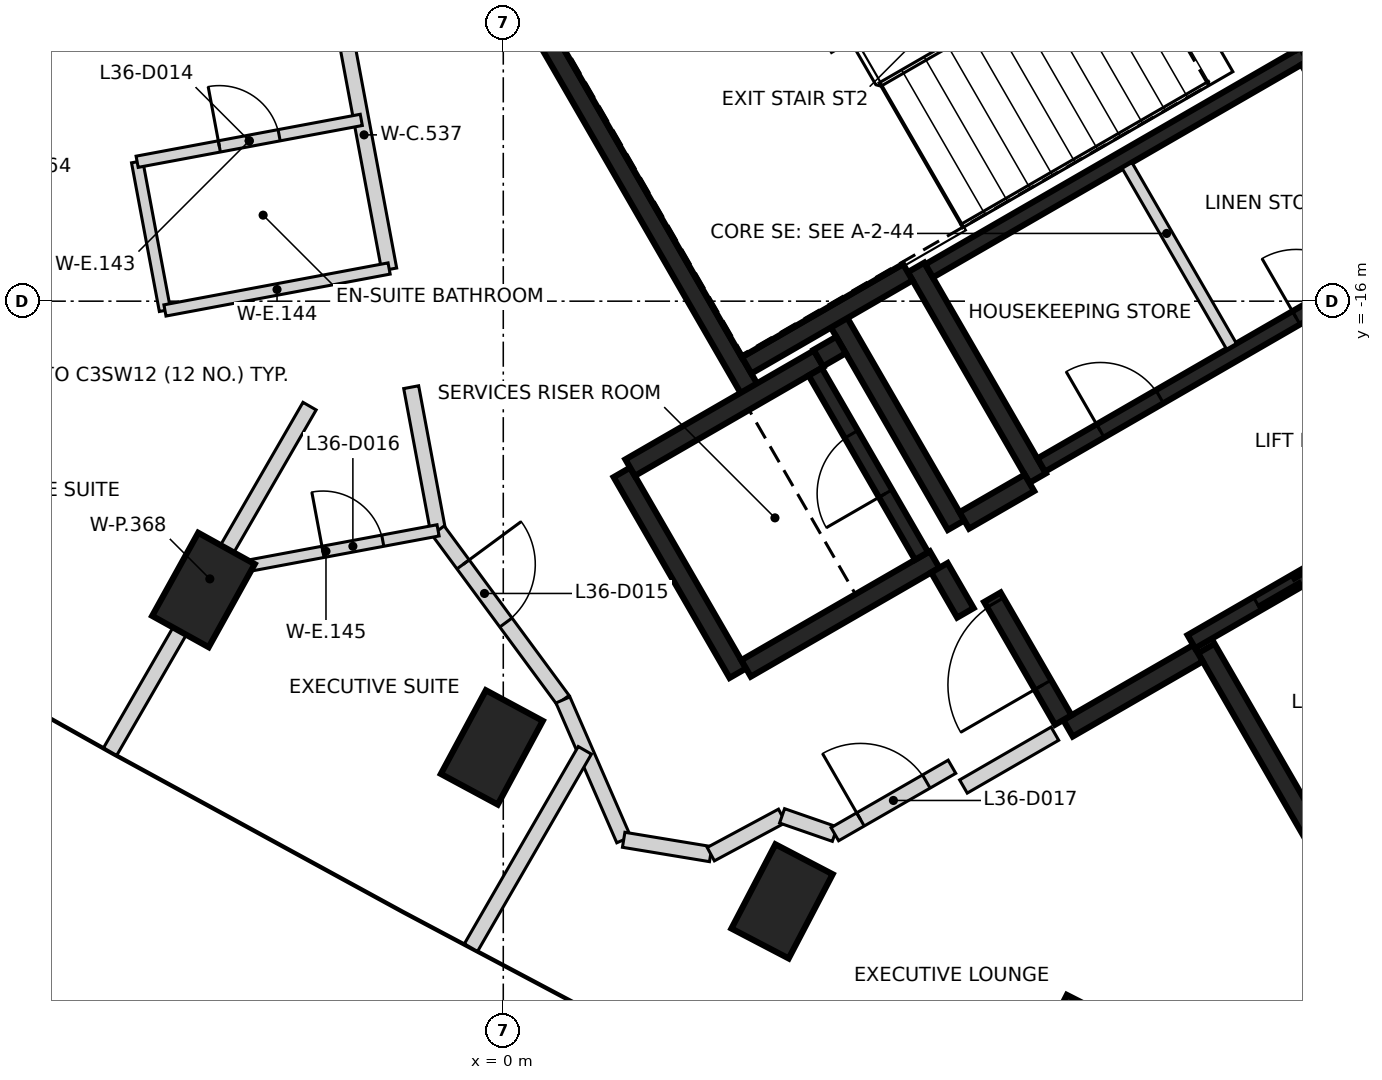
"""IFC4 building model, lengths in metres.
Left out: names, types, materials, properties, quantities, classifications, styles, units other than length and angle.
Written with IfcOpenShell. Run it as: python <this file> out.ifc"""

import sys

from ifc_helpers import new_model, si_unit, direction, frame, frame_2d, origin, origin_2d, place, context, subcontext, project, spatial, rectangle, extrude, element, fill, save


model = new_model("IFC4")
c1 = context("Model", 3, precision=1e-05, world=origin(), true_north=direction((0.0, 1.0)))
c2 = subcontext(c1, "Body", "Model", "MODEL_VIEW")
j1 = project(units=[si_unit("LENGTHUNIT", "METRE"), si_unit("PLANEANGLEUNIT", "RADIAN")], contexts=[c1])
p1 = place(None, origin())
s1 = spatial("IfcSite", under=j1, at=p1, CompositionType="ELEMENT")
p2 = place(p1, origin())
s2 = spatial("IfcBuilding", under=s1, at=p2, CompositionType="ELEMENT")
p3 = place(p2, frame((0.0, 0.0, 146.8)))
s3 = spatial("IfcBuildingStorey", under=s2, at=p3, CompositionType="ELEMENT", Elevation=146.8)
for number, where, z_axis, x_axis in (
    (1, (-3.945, -19.8, -0.4), (0.0, 0.0, 1.0), (0.485, 0.875, 0.0)),
    (2, (-0.151, -21.871, -0.4), (0.0, 0.0, 1.0), (0.474, 0.881, 0.0)),
    (3, (3.667, -23.896, -0.4), (0.0, 0.0, 1.0), (0.463, 0.886, 0.0)),
    (4, (7.51, -25.876, -0.4), (0.0, 0.0, 1.0), (0.453, 0.892, 0.0)),
):
    element("IfcColumn", number, at=place(p3, frame(where, z_axis=z_axis, x_axis=x_axis)), inside=s3, PredefinedType="COLUMN", context=c2, shape_type="SweptSolid", body=[
        extrude(rectangle(XDim=1.25, YDim=0.85, at=origin_2d()), origin(), (0.0, 0.0, 1.0), 3.6),
    ])
p4 = place(p3, frame((3.235, -17.153, 0.0), z_axis=(0.0, 0.0, 1.0), x_axis=(-0.500008851346, 0.866020293397, 0.0)))
e5 = element("IfcWall", 5, at=p4, inside=s3, PredefinedType="SHEAR", context=c2, shape_type="SweptSolid", body=[
    extrude(rectangle(XDim=5.51, YDim=0.25, at=frame_2d((2.755, 0.0))), origin(), (0.0, 0.0, 1.0), 3.2),
])
p5 = place(p3, frame((7.031, -18.327, 0.0), z_axis=(0.0, 0.0, 1.0), x_axis=(-0.499971222258, 0.866042017984, 0.0)))
e6 = element("IfcWall", 6, at=p5, inside=s3, PredefinedType="SHEAR", context=c2, shape_type="SweptSolid", body=[
    extrude(rectangle(XDim=3.2, YDim=0.25, at=frame_2d((1.6, 0.0))), origin(), (0.0, 0.0, 1.0), 3.2),
])
p6 = place(p3, frame((10.736, -23.145, 0.0), z_axis=(0.0, 0.0, 1.0), x_axis=(-0.500023226632, 0.866011993467, 0.0)))
e7 = element("IfcWall", 7, at=p6, inside=s3, PredefinedType="SHEAR", context=c2, shape_type="SweptSolid", body=[
    extrude(rectangle(XDim=2.974, YDim=0.25, at=frame_2d((1.487, 0.0))), origin(), (0.0, 0.0, 1.0), 3.2),
])
p7 = place(p3, frame((3.085, -20.894, 0.0), z_axis=(0.0, 0.0, 1.0), x_axis=(-0.499978833458, 0.866037623948, 0.0)))
e8 = element("IfcWall", 8, at=p7, inside=s3, PredefinedType="SHEAR", context=c2, shape_type="SweptSolid", body=[
    extrude(rectangle(XDim=3.05, YDim=0.25, at=frame_2d((1.525, 0.0))), origin(), (0.0, 0.0, 1.0), 3.2),
])
p8 = place(p3, frame((1.669, -18.19, 0.0), z_axis=(0.0, 0.0, 1.0), x_axis=(0.866042235819, 0.499970844928, 0.0)))
e9 = element("IfcWall", 9, at=p8, inside=s3, PredefinedType="SHEAR", context=c2, shape_type="SweptSolid", body=[
    extrude(rectangle(XDim=2.865, YDim=0.25, at=frame_2d((1.432, 0.0))), origin(), (0.0, 0.0, 1.0), 3.2),
])
p9 = place(p3, frame((5.675, -19.399, 0.0), z_axis=(0.0, 0.0, 1.0), x_axis=(-0.866026637627, -0.499997862916, 0.0)))
e10 = element("IfcWall", 10, at=p9, inside=s3, PredefinedType="SHEAR", context=c2, shape_type="SweptSolid", body=[
    extrude(rectangle(XDim=2.865, YDim=0.25, at=frame_2d((1.432, 0.0))), origin(), (0.0, 0.0, 1.0), 3.2),
])
p10 = place(p3, frame((4.414, -16.276, 0.0), z_axis=(0.0, 0.0, 1.0), x_axis=(0.500003324108, -0.866023484601, 0.0)))
e11 = element("IfcWall", 11, at=p10, inside=s3, PredefinedType="SHEAR", context=c2, shape_type="SweptSolid", body=[
    extrude(rectangle(XDim=3.085, YDim=0.25, at=frame_2d((1.542, 0.0))), origin(), (0.0, 0.0, 1.0), 3.2),
])
p11 = place(p3, frame((5.322, -15.619, 0.0), z_axis=(0.0, 0.0, 1.0), x_axis=(-0.866026229868, -0.499998569178, 0.0)))
e12 = element("IfcWall", 12, at=p11, inside=s3, PredefinedType="SHEAR", context=c2, shape_type="SweptSolid", body=[
    extrude(rectangle(XDim=2.449, YDim=0.25, at=frame_2d((1.225, 0.0))), origin(), (0.0, 0.0, 1.0), 3.2),
])
p12 = place(p3, frame((9.14, -20.631, 0.0), z_axis=(0.0, 0.0, 1.0), x_axis=(-0.866043531843, -0.499968599967, 0.0)))
e13 = element("IfcWall", 13, at=p12, inside=s3, PredefinedType="SHEAR", context=c2, shape_type="SweptSolid", body=[
    extrude(rectangle(XDim=1.975, YDim=0.25, at=frame_2d((0.987, 0.0))), origin(), (0.0, 0.0, 1.0), 3.2),
])
p13 = place(p3, frame((7.367, -21.51, 0.0), z_axis=(0.0, 0.0, 1.0), x_axis=(-0.499983108224, 0.866035156036, 0.0)))
e14 = element("IfcWall", 14, at=p13, inside=s3, PredefinedType="SHEAR", context=c2, shape_type="SweptSolid", body=[
    extrude(rectangle(XDim=1.865, YDim=0.25, at=frame_2d((0.932, 0.0))), origin(), (0.0, 0.0, 1.0), 3.2),
])
p14 = place(p13, frame((0.535, 0.0, 0.0)))
e15 = element("IfcOpeningElement", 15, at=p14, cuts=e14, PredefinedType="OPENING", context=c2, shape_type="SweptSolid", body=[
    extrude(rectangle(XDim=1.25, YDim=2.1, at=frame_2d((0.625, 1.05))), frame((0.0, 0.135, 0.0), z_axis=(0.0, -1.0, 0.0), x_axis=(1.0, 0.0, 0.0)), (0.0, 0.0, 1.0), 0.27),
])
p15 = place(p3, frame((6.065, -18.885, 0.0), z_axis=(0.0, 0.0, 1.0), x_axis=(0.866017078145, 0.500014420154, 0.0)))
e16 = element("IfcWall", 16, at=p15, inside=s3, PredefinedType="SHEAR", context=c2, shape_type="SweptSolid", body=[
    extrude(rectangle(XDim=0.989, YDim=0.25, at=frame_2d((0.495, 0.0))), origin(), (0.0, 0.0, 1.0), 3.2),
])
p16 = place(p3, frame((6.08, -20.1, 0.0), z_axis=(0.0, 0.0, 1.0), x_axis=(-0.500051773299, 0.865995510393, 0.0)))
e17 = element("IfcWall", 17, at=p16, inside=s3, PredefinedType="SHEAR", context=c2, shape_type="SweptSolid", body=[
    extrude(rectangle(XDim=0.685, YDim=0.25, at=frame_2d((0.342, 0.0))), origin(), (0.0, 0.0, 1.0), 3.2),
])
p17 = place(p3, frame((4.145, -16.749, 0.0), z_axis=(0.0, 0.0, 1.0), x_axis=(0.866185586049, 0.49972245349, 0.0)))
e18 = element("IfcWall", 18, at=p17, inside=s3, PredefinedType="SHEAR", context=c2, shape_type="SweptSolid", body=[
    extrude(rectangle(XDim=0.344, YDim=0.25, at=frame_2d((0.172, 0.0))), origin(), (0.0, 0.0, 1.0), 3.2),
])
p18 = place(p3, frame((9.052, -20.48, 0.0), z_axis=(0.0, 0.0, 1.0), x_axis=(0.866030299012, 0.499991521122, 0.0)))
e19 = element("IfcWall", 19, at=p18, inside=s3, PredefinedType="SHEAR", context=c2, shape_type="SweptSolid", body=[
    extrude(rectangle(XDim=6.1, YDim=0.2, at=frame_2d((3.05, 0.0))), origin(), (0.0, 0.0, 1.0), 3.2),
])
p19 = place(p18, frame((1.0, 0.0, 0.0)))
e20 = element("IfcOpeningElement", 20, at=p19, cuts=e19, PredefinedType="OPENING", context=c2, shape_type="SweptSolid", body=[
    extrude(rectangle(XDim=1.2, YDim=2.1, at=frame_2d((0.6, 1.05))), frame((0.0, 0.11, 0.0), z_axis=(0.0, -1.0, 0.0), x_axis=(1.0, 0.0, 0.0)), (0.0, 0.0, 1.0), 0.22),
])
p20 = place(p18, frame((4.05, 0.0, 0.0)))
e21 = element("IfcOpeningElement", 21, at=p20, cuts=e19, PredefinedType="OPENING", context=c2, shape_type="SweptSolid", body=[
    extrude(rectangle(XDim=1.2, YDim=2.1, at=frame_2d((0.6, 1.05))), frame((0.0, 0.11, 0.0), z_axis=(0.0, -1.0, 0.0), x_axis=(1.0, 0.0, 0.0)), (0.0, 0.0, 1.0), 0.22),
])
p21 = place(p3, frame((10.538, -12.752, 0.0), z_axis=(0.0, 0.0, 1.0), x_axis=(-0.866038630372, -0.499977090179, 0.0)))
e22 = element("IfcWall", 22, at=p21, inside=s3, PredefinedType="SHEAR", context=c2, shape_type="SweptSolid", body=[
    extrude(rectangle(XDim=5.699, YDim=0.2, at=frame_2d((2.85, 0.0))), origin(), (0.0, 0.0, 1.0), 3.2),
])
p22 = place(p3, frame((7.077, -18.156, 0.0), z_axis=(0.0, 0.0, 1.0), x_axis=(0.866038630372, 0.499977090179, 0.0)))
e23 = element("IfcWall", 23, at=p22, inside=s3, PredefinedType="SHEAR", context=c2, shape_type="SweptSolid", body=[
    extrude(rectangle(XDim=5.699, YDim=0.2, at=frame_2d((2.85, 0.0))), origin(), (0.0, 0.0, 1.0), 3.2),
])
p23 = place(p22, frame((0.899, 0.0, 0.0)))
e24 = element("IfcOpeningElement", 24, at=p23, cuts=e23, PredefinedType="OPENING", context=c2, shape_type="SweptSolid", body=[
    extrude(rectangle(XDim=0.9, YDim=2.1, at=frame_2d((0.45, 1.05))), frame((0.0, 0.11, 0.0), z_axis=(0.0, -1.0, 0.0), x_axis=(1.0, 0.0, 0.0)), (0.0, 0.0, 1.0), 0.22),
])
p24 = place(p22, frame((3.874, 0.0, 0.0)))
e25 = element("IfcOpeningElement", 25, at=p24, cuts=e23, PredefinedType="OPENING", context=c2, shape_type="SweptSolid", body=[
    extrude(rectangle(XDim=0.9, YDim=2.1, at=frame_2d((0.45, 1.05))), frame((0.0, 0.11, 0.0), z_axis=(0.0, -1.0, 0.0), x_axis=(1.0, 0.0, 0.0)), (0.0, 0.0, 1.0), 0.22),
])
p25 = place(p3, frame((5.503, -19.352, 0.0), z_axis=(0.0, 0.0, 1.0), x_axis=(-0.499986818241, 0.866033014143, 0.0)))
e26 = element("IfcWall", 26, at=p25, inside=s3, PredefinedType="SHEAR", context=c2, shape_type="SweptSolid", body=[
    extrude(rectangle(XDim=2.798, YDim=0.2, at=frame_2d((1.399, 0.0))), origin(), (0.0, 0.0, 1.0), 3.2),
])
p26 = place(p25, frame((0.949, 0.0, 0.0)))
e27 = element("IfcOpeningElement", 27, at=p26, cuts=e26, PredefinedType="OPENING", context=c2, shape_type="SweptSolid", body=[
    extrude(rectangle(XDim=0.9, YDim=2.1, at=frame_2d((0.45, 1.05))), frame((0.0, 0.11, 0.0), z_axis=(0.0, -1.0, 0.0), x_axis=(1.0, 0.0, 0.0)), (0.0, 0.0, 1.0), 0.22),
])
p27 = place(p3, frame((11.963, -15.22, 0.0), z_axis=(0.0, 0.0, 1.0), x_axis=(-0.500034990121, 0.866005201286, 0.0)))
e28 = element("IfcWall", 28, at=p27, inside=s3, PredefinedType="SHEAR", context=c2, shape_type="SweptSolid", body=[
    extrude(rectangle(XDim=2.75, YDim=0.2, at=frame_2d((1.375, 0.0))), origin(), (0.0, 0.0, 1.0), 3.2),
])
p28 = place(p3, frame((8.207, -14.214, 0.0), z_axis=(0.0, 0.0, 1.0), x_axis=(0.50002746344, -0.86600954718, 0.0)))
e29 = element("IfcWall", 29, at=p28, inside=s3, PredefinedType="PARTITIONING", context=c2, shape_type="SweptSolid", body=[
    extrude(rectangle(XDim=2.748, YDim=0.15, at=frame_2d((1.374, 0.0))), origin(), (0.0, 0.0, 1.0), 3.2),
])
p29 = place(p3, frame((-2.162, -12.042, 0.0), z_axis=(0.0, 0.0, 1.0), x_axis=(0.183572226488, -0.983006224631, 0.0)))
e30 = element("IfcWall", 30, at=p29, inside=s3, PredefinedType="PARTITIONING", context=c2, shape_type="SweptSolid", body=[
    extrude(rectangle(XDim=3.602, YDim=0.2, at=frame_2d((1.801, 0.0))), origin(), (0.0, 0.0, 1.0), 3.2),
])
p30 = place(p3, frame((-1.212, -17.131, 0.0), z_axis=(0.0, 0.0, 1.0), x_axis=(0.183680924698, -0.982985919483, 0.0)))
e31 = element("IfcWall", 31, at=p30, inside=s3, PredefinedType="PARTITIONING", context=c2, shape_type="SweptSolid", body=[
    extrude(rectangle(XDim=1.917, YDim=0.2, at=frame_2d((0.958, 0.0))), origin(), (0.0, 0.0, 1.0), 3.2),
])
p31 = place(p3, frame((-0.858, -19.016, 0.0), z_axis=(0.0, 0.0, 1.0), x_axis=(0.593123867414, -0.805111220829, 0.0)))
e32 = element("IfcWall", 32, at=p31, inside=s3, PredefinedType="PARTITIONING", context=c2, shape_type="SweptSolid", body=[
    extrude(rectangle(XDim=2.77, YDim=0.2, at=frame_2d((1.385, 0.0))), origin(), (0.0, 0.0, 1.0), 3.2),
])
p32 = place(p31, frame((0.555, 0.0, 0.0)))
e33 = element("IfcOpeningElement", 33, at=p32, cuts=e32, PredefinedType="OPENING", context=c2, shape_type="SweptSolid", body=[
    extrude(rectangle(XDim=0.95, YDim=2.1, at=frame_2d((0.475, 1.05))), frame((0.0, 0.11, 0.0), z_axis=(0.0, -1.0, 0.0), x_axis=(1.0, 0.0, 0.0)), (0.0, 0.0, 1.0), 0.22),
])
p33 = place(p3, frame((0.785, -21.246, 0.0), z_axis=(0.0, 0.0, 1.0), x_axis=(0.398864077761, -0.917010058545, 0.0)))
e34 = element("IfcWall", 34, at=p33, inside=s3, PredefinedType="PARTITIONING", context=c2, shape_type="SweptSolid", body=[
    extrude(rectangle(XDim=2.006, YDim=0.2, at=frame_2d((1.003, 0.0))), origin(), (0.0, 0.0, 1.0), 2.3),
])
p34 = place(p3, frame((1.584, -23.086, 0.0), z_axis=(0.0, 0.0, 1.0), x_axis=(0.986654221629, -0.162829502674, 0.0)))
e35 = element("IfcWall", 35, at=p34, inside=s3, PredefinedType="PARTITIONING", context=c2, shape_type="SweptSolid", body=[
    extrude(rectangle(XDim=1.16, YDim=0.2, at=frame_2d((0.58, 0.0))), origin(), (0.0, 0.0, 1.0), 2.3),
])
p35 = place(p3, frame((2.73, -23.275, 0.0), z_axis=(0.0, 0.0, 1.0), x_axis=(0.880927165636, 0.473251866182, 0.0)))
e36 = element("IfcWall", 36, at=p35, inside=s3, PredefinedType="PARTITIONING", context=c2, shape_type="SweptSolid", body=[
    extrude(rectangle(XDim=1.065, YDim=0.2, at=frame_2d((0.532, 0.0))), origin(), (0.0, 0.0, 1.0), 3.2),
])
p36 = place(p3, frame((3.668, -22.771, 0.0), z_axis=(0.0, 0.0, 1.0), x_axis=(0.944689393684, -0.327966384652, 0.0)))
e37 = element("IfcWall", 37, at=p36, inside=s3, PredefinedType="PARTITIONING", context=c2, shape_type="SweptSolid", body=[
    extrude(rectangle(XDim=0.735, YDim=0.2, at=frame_2d((0.367, 0.0))), origin(), (0.0, 0.0, 1.0), 3.2),
])
p37 = place(p3, frame((4.362, -23.012, 0.0), z_axis=(0.0, 0.0, 1.0), x_axis=(0.866692617793, 0.49884256661, 0.0)))
e38 = element("IfcWall", 38, at=p37, inside=s3, PredefinedType="PARTITIONING", context=c2, shape_type="SweptSolid", body=[
    extrude(rectangle(XDim=1.778, YDim=0.2, at=frame_2d((0.889, 0.0))), origin(), (0.0, 0.0, 1.0), 3.2),
])
p38 = place(p37, frame((0.389, 0.0, 0.0)))
e39 = element("IfcOpeningElement", 39, at=p38, cuts=e38, PredefinedType="OPENING", context=c2, shape_type="SweptSolid", body=[
    extrude(rectangle(XDim=1.0, YDim=2.1, at=frame_2d((0.5, 1.05))), frame((0.0, 0.11, 0.0), z_axis=(0.0, -1.0, 0.0), x_axis=(1.0, 0.0, 0.0)), (0.0, 0.0, 1.0), 0.22),
])
p39 = place(p3, frame((6.054, -22.385, 0.0), z_axis=(0.0, 0.0, 1.0), x_axis=(0.86593101922, 0.500163443238, 0.0)))
e40 = element("IfcWall", 40, at=p39, inside=s3, PredefinedType="PARTITIONING", context=c2, shape_type="SweptSolid", body=[
    extrude(rectangle(XDim=1.39, YDim=0.2, at=frame_2d((0.695, 0.0))), origin(), (0.0, 0.0, 1.0), 3.2),
])
p40 = place(p3, frame((-9.882, -19.267, 0.0), z_axis=(0.0, 0.0, 1.0), x_axis=(0.499993811829, 0.866028976497, 0.0)))
e41 = element("IfcWall", 41, at=p40, inside=s3, PredefinedType="PARTITIONING", context=c2, shape_type="SweptSolid", body=[
    extrude(rectangle(XDim=12.227, YDim=0.2, at=frame_2d((6.114, 0.0))), origin(), (0.0, 0.0, 1.0), 2.3),
])
p41 = place(p3, frame((-5.173, -21.926, 0.0), z_axis=(0.0, 0.0, 1.0), x_axis=(0.499941227542, 0.86605933342, 0.0)))
e42 = element("IfcWall", 42, at=p41, inside=s3, PredefinedType="PARTITIONING", context=c2, shape_type="SweptSolid", body=[
    extrude(rectangle(XDim=5.249, YDim=0.2, at=frame_2d((2.625, 0.0))), origin(), (0.0, 0.0, 1.0), 3.2),
])
p42 = place(p3, frame((-0.425, -24.505, 0.0), z_axis=(0.0, 0.0, 1.0), x_axis=(0.499915194772, 0.86607436057, 0.0)))
e43 = element("IfcWall", 43, at=p42, inside=s3, PredefinedType="PARTITIONING", context=c2, shape_type="SweptSolid", body=[
    extrude(rectangle(XDim=2.997, YDim=0.2, at=frame_2d((1.499, 0.0))), origin(), (0.0, 0.0, 1.0), 2.3),
])
p43 = place(p3, frame((-4.817, -14.166, 0.0), z_axis=(0.0, 0.0, 1.0), x_axis=(0.183903339385, -0.982944332993, 0.0)))
e44 = element("IfcWall", 44, at=p43, inside=s3, PredefinedType="PARTITIONING", context=c2, shape_type="SweptSolid", body=[
    extrude(rectangle(XDim=1.99, YDim=0.15, at=frame_2d((0.995, 0.0))), origin(), (0.0, 0.0, 1.0), 3.2),
])
p44 = place(p3, frame((-4.817, -14.166, 0.0), z_axis=(0.0, 0.0, 1.0), x_axis=(0.982987155193, 0.183674311555, 0.0)))
e45 = element("IfcWall", 45, at=p44, inside=s3, PredefinedType="PARTITIONING", context=c2, shape_type="SweptSolid", body=[
    extrude(rectangle(XDim=3.0, YDim=0.15, at=frame_2d((1.5, 0.0))), origin(), (0.0, 0.0, 1.0), 3.2),
])
p45 = place(p44, frame((1.1, 0.0, 0.0)))
e46 = element("IfcOpeningElement", 46, at=p45, cuts=e45, PredefinedType="OPENING", context=c2, shape_type="SweptSolid", body=[
    extrude(rectangle(XDim=0.8, YDim=2.1, at=frame_2d((0.4, 1.05))), frame((0.0, 0.085, 0.0), z_axis=(0.0, -1.0, 0.0), x_axis=(1.0, 0.0, 0.0)), (0.0, 0.0, 1.0), 0.17),
])
p46 = place(p3, frame((-4.451, -16.122, 0.0), z_axis=(0.0, 0.0, 1.0), x_axis=(0.982928336035, 0.18398882091, 0.0)))
e47 = element("IfcWall", 47, at=p46, inside=s3, PredefinedType="PARTITIONING", context=c2, shape_type="SweptSolid", body=[
    extrude(rectangle(XDim=3.0, YDim=0.15, at=frame_2d((1.5, 0.0))), origin(), (0.0, 0.0, 1.0), 3.2),
])
p47 = place(p3, frame((-3.807, -19.566, 0.0), z_axis=(0.0, 0.0, 1.0), x_axis=(0.982987155193, 0.183674311555, 0.0)))
e48 = element("IfcWall", 48, at=p47, inside=s3, PredefinedType="PARTITIONING", context=c2, shape_type="SweptSolid", body=[
    extrude(rectangle(XDim=3.0, YDim=0.15, at=frame_2d((1.5, 0.0))), origin(), (0.0, 0.0, 1.0), 3.2),
])
p48 = place(p47, frame((1.46, 0.0, 0.0)))
e49 = element("IfcOpeningElement", 49, at=p48, cuts=e48, PredefinedType="OPENING", context=c2, shape_type="SweptSolid", body=[
    extrude(rectangle(XDim=0.8, YDim=2.1, at=frame_2d((0.4, 1.05))), frame((0.0, 0.085, 0.0), z_axis=(0.0, -1.0, 0.0), x_axis=(1.0, 0.0, 0.0)), (0.0, 0.0, 1.0), 0.17),
])
p49 = place(p19, origin())
e50 = element("IfcDoor", 50, at=p49, inside=s3, OperationType="DOUBLE_DOOR_SLIDING", PredefinedType="DOOR", context=c2, shape_type="SweptSolid", body=[
    extrude(rectangle(XDim=1.2, YDim=2.1, at=frame_2d((0.6, 1.05))), frame((0.0, 0.025, 0.0), z_axis=(0.0, -1.0, 0.0), x_axis=(1.0, 0.0, 0.0)), (0.0, 0.0, 1.0), 0.05),
])
fill(e20, e50)
p50 = place(p14, origin())
e51 = element("IfcDoor", 51, at=p50, inside=s3, OperationType="SINGLE_SWING_LEFT", PredefinedType="DOOR", context=c2, shape_type="SweptSolid", body=[
    extrude(rectangle(XDim=1.25, YDim=2.1, at=frame_2d((0.625, 1.05))), frame((0.0, 0.025, 0.0), z_axis=(0.0, -1.0, 0.0), x_axis=(1.0, 0.0, 0.0)), (0.0, 0.0, 1.0), 0.05),
])
fill(e15, e51)
p51 = place(p23, origin())
e52 = element("IfcDoor", 52, at=p51, inside=s3, OperationType="SINGLE_SWING_RIGHT", PredefinedType="DOOR", context=c2, shape_type="SweptSolid", body=[
    extrude(rectangle(XDim=0.9, YDim=2.1, at=frame_2d((0.45, 1.05))), frame((0.0, 0.025, 0.0), z_axis=(0.0, -1.0, 0.0), x_axis=(1.0, 0.0, 0.0)), (0.0, 0.0, 1.0), 0.05),
])
fill(e24, e52)
p52 = place(p24, origin())
e53 = element("IfcDoor", 53, at=p52, inside=s3, OperationType="SINGLE_SWING_LEFT", PredefinedType="DOOR", context=c2, shape_type="SweptSolid", body=[
    extrude(rectangle(XDim=0.9, YDim=2.1, at=frame_2d((0.45, 1.05))), frame((0.0, 0.025, 0.0), z_axis=(0.0, -1.0, 0.0), x_axis=(1.0, 0.0, 0.0)), (0.0, 0.0, 1.0), 0.05),
])
fill(e25, e53)
p53 = place(p26, origin())
e54 = element("IfcDoor", 54, at=p53, inside=s3, OperationType="SINGLE_SWING_RIGHT", PredefinedType="DOOR", context=c2, shape_type="SweptSolid", body=[
    extrude(rectangle(XDim=0.9, YDim=2.1, at=frame_2d((0.45, 1.05))), frame((0.0, 0.025, 0.0), z_axis=(0.0, -1.0, 0.0), x_axis=(1.0, 0.0, 0.0)), (0.0, 0.0, 1.0), 0.05),
])
fill(e27, e54)
p54 = place(p45, frame((0.8, 0.0, 0.0), z_axis=(0.0, 0.0, 1.0), x_axis=(-1.0, 0.0, 0.0)))
e55 = element("IfcDoor", 55, at=p54, inside=s3, OperationType="SINGLE_SWING_LEFT", PredefinedType="DOOR", context=c2, shape_type="SweptSolid", body=[
    extrude(rectangle(XDim=0.8, YDim=2.1, at=frame_2d((0.4, 1.05))), frame((0.0, 0.025, 0.0), z_axis=(0.0, -1.0, 0.0), x_axis=(1.0, 0.0, 0.0)), (0.0, 0.0, 1.0), 0.05),
])
fill(e46, e55)
p55 = place(p32, frame((0.95, 0.0, 0.0), z_axis=(0.0, 0.0, 1.0), x_axis=(-1.0, 0.0, 0.0)))
e56 = element("IfcDoor", 56, at=p55, inside=s3, OperationType="SINGLE_SWING_LEFT", PredefinedType="DOOR", context=c2, shape_type="SweptSolid", body=[
    extrude(rectangle(XDim=0.95, YDim=2.1, at=frame_2d((0.475, 1.05))), frame((0.0, 0.025, 0.0), z_axis=(0.0, -1.0, 0.0), x_axis=(1.0, 0.0, 0.0)), (0.0, 0.0, 1.0), 0.05),
])
fill(e33, e56)
p56 = place(p48, frame((0.8, 0.0, 0.0), z_axis=(0.0, 0.0, 1.0), x_axis=(-1.0, 0.0, 0.0)))
e57 = element("IfcDoor", 57, at=p56, inside=s3, OperationType="SINGLE_SWING_LEFT", PredefinedType="DOOR", context=c2, shape_type="SweptSolid", body=[
    extrude(rectangle(XDim=0.8, YDim=2.1, at=frame_2d((0.4, 1.05))), frame((0.0, 0.025, 0.0), z_axis=(0.0, -1.0, 0.0), x_axis=(1.0, 0.0, 0.0)), (0.0, 0.0, 1.0), 0.05),
])
fill(e49, e57)
p57 = place(p38, frame((1.0, 0.0, 0.0), z_axis=(0.0, 0.0, 1.0), x_axis=(-1.0, 0.0, 0.0)))
e58 = element("IfcDoor", 58, at=p57, inside=s3, OperationType="SINGLE_SWING_LEFT", PredefinedType="DOOR", context=c2, shape_type="SweptSolid", body=[
    extrude(rectangle(XDim=1.0, YDim=2.1, at=frame_2d((0.5, 1.05))), frame((0.0, 0.025, 0.0), z_axis=(0.0, -1.0, 0.0), x_axis=(1.0, 0.0, 0.0)), (0.0, 0.0, 1.0), 0.05),
])
fill(e39, e58)
save(model, sys.argv[1])
